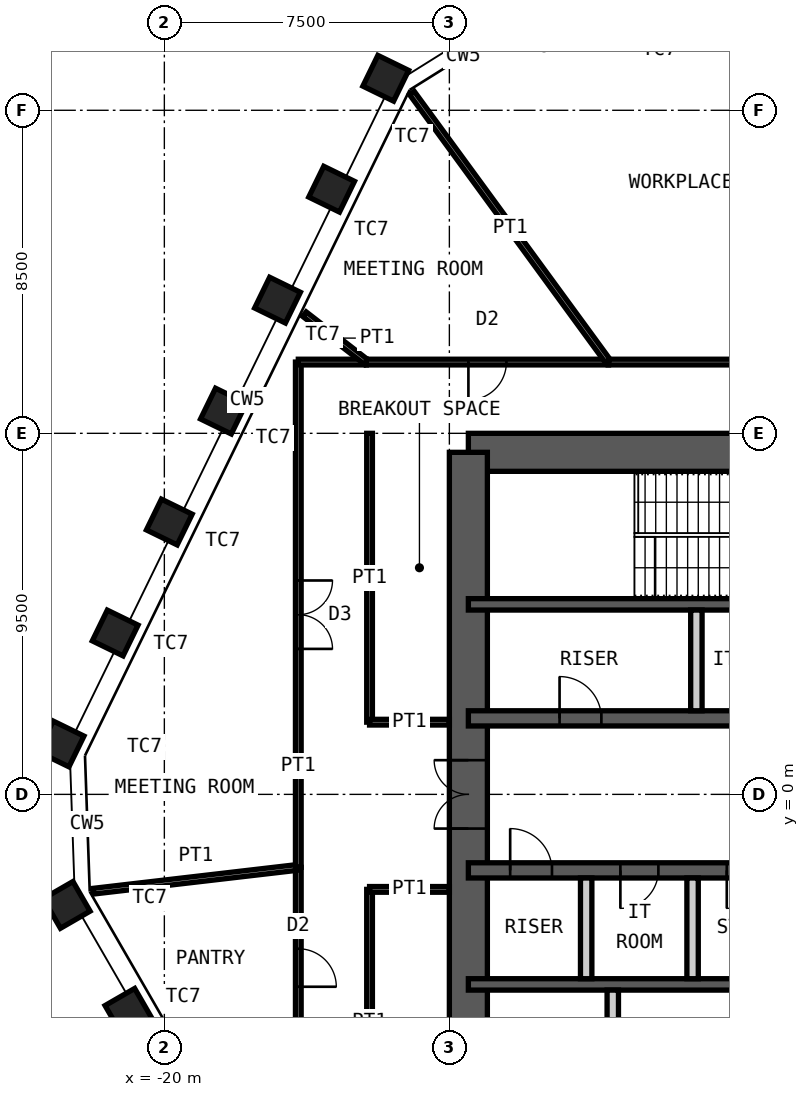
"""IFC4 building model, lengths in metres.
Left out: names, types, materials, properties, quantities, classifications, styles, units other than length and angle.
Written with IfcOpenShell. Run it as: python <this file> out.ifc"""

import sys

from ifc_helpers import new_model, si_unit, direction, frame, frame_2d, origin, origin_2d, place, context, subcontext, project, spatial, rectangle, hollow_rectangle, extrude, element, fill, save


model = new_model("IFC4")
c1 = context("Model", 3, precision=1e-05, world=origin(), true_north=direction((0.0, 1.0)))
c2 = subcontext(c1, "Body", "Model", "MODEL_VIEW")
j1 = project(units=[si_unit("LENGTHUNIT", "METRE"), si_unit("PLANEANGLEUNIT", "RADIAN")], contexts=[c1])
p1 = place(None, origin())
s1 = spatial("IfcSite", under=j1, at=p1, CompositionType="ELEMENT")
p2 = place(p1, origin())
s2 = spatial("IfcBuilding", under=s1, at=p2, CompositionType="ELEMENT")
p3 = place(p2, frame((0.0, 0.0, 287.2)))
s3 = spatial("IfcBuildingStorey", under=s2, at=p3, CompositionType="ELEMENT", Elevation=287.2)
for number, where, z_axis, x_axis in (
    (1, (-20.946, -5.721, 0.0), (0.0, 0.0, 1.0), (0.5, -0.866, 0.0)),
    (2, (-22.57, -2.908, 0.0), (0.0, 0.0, 1.0), (0.5, -0.866, 0.0)),
    (3, (-22.717, 1.327, 0.0), (0.0, 0.0, 1.0), (-0.438, -0.899, 0.0)),
    (4, (-21.293, 4.246, 0.0), (0.0, 0.0, 1.0), (-0.438, -0.899, 0.0)),
    (5, (-19.87, 7.166, 0.0), (0.0, 0.0, 1.0), (-0.438, -0.899, 0.0)),
    (6, (-18.446, 10.085, 0.0), (0.0, 0.0, 1.0), (-0.438, -0.899, 0.0)),
    (7, (-17.022, 13.004, 0.0), (0.0, 0.0, 1.0), (-0.438, -0.899, 0.0)),
    (8, (-15.598, 15.924, 0.0), (0.0, 0.0, 1.0), (-0.438, -0.899, 0.0)),
    (9, (-14.174, 18.843, 0.0), (0.0, 0.0, 1.0), (-0.438, -0.899, 0.0)),
):
    element("IfcColumn", number, at=place(p3, frame(where, z_axis=z_axis, x_axis=x_axis)), inside=s3, PredefinedType="COLUMN", context=c2, shape_type="SweptSolid", body=[
        extrude(hollow_rectangle(XDim=0.9, YDim=0.9, WallThickness=0.06, at=origin_2d()), origin(), (0.0, 0.0, 1.0), 4.2),
    ])
p4 = place(p3, frame((-12.0, 9.0, 0.0), z_axis=(0.0, 0.0, 1.0), x_axis=(1.0, 0.0, 0.0)))
e10 = element("IfcWall", 10, at=p4, inside=s3, PredefinedType="SHEAR", context=c2, shape_type="SweptSolid", body=[
    extrude(rectangle(XDim=24.0, YDim=1.0, at=frame_2d((12.0, 0.0))), origin(), (0.0, 0.0, 1.0), 4.2),
])
p5 = place(p4, frame((10.4, 0.0, 0.0)))
e11 = element("IfcOpeningElement", 11, at=p5, cuts=e10, PredefinedType="OPENING", context=c2, shape_type="SweptSolid", body=[
    extrude(rectangle(XDim=1.0, YDim=2.1, at=frame_2d((0.5, 1.05))), frame((0.0, 0.51, 0.0), z_axis=(0.0, -1.0, 0.0), x_axis=(1.0, 0.0, 0.0)), (0.0, 0.0, 1.0), 1.02),
])
p6 = place(p4, frame((17.6, 0.0, 0.0)))
e12 = element("IfcOpeningElement", 12, at=p6, cuts=e10, PredefinedType="OPENING", context=c2, shape_type="SweptSolid", body=[
    extrude(rectangle(XDim=0.9, YDim=2.1, at=frame_2d((0.45, 1.05))), frame((0.0, 0.51, 0.0), z_axis=(0.0, -1.0, 0.0), x_axis=(1.0, 0.0, 0.0)), (0.0, 0.0, 1.0), 1.02),
])
p7 = place(p4, frame((21.9, 0.0, 0.0)))
e13 = element("IfcOpeningElement", 13, at=p7, cuts=e10, PredefinedType="OPENING", context=c2, shape_type="SweptSolid", body=[
    extrude(rectangle(XDim=0.9, YDim=2.1, at=frame_2d((0.45, 1.05))), frame((0.0, 0.51, 0.0), z_axis=(0.0, -1.0, 0.0), x_axis=(1.0, 0.0, 0.0)), (0.0, 0.0, 1.0), 1.02),
])
p8 = place(p3, frame((-12.0, -9.0, 0.0), z_axis=(0.0, 0.0, 1.0), x_axis=(0.0, 1.0, 0.0)))
e14 = element("IfcWall", 14, at=p8, inside=s3, PredefinedType="SHEAR", context=c2, shape_type="SweptSolid", body=[
    extrude(rectangle(XDim=18.0, YDim=1.0, at=frame_2d((9.0, 0.0))), origin(), (0.0, 0.0, 1.0), 4.2),
])
p9 = place(p8, frame((8.1, 0.0, 0.0)))
e15 = element("IfcOpeningElement", 15, at=p9, cuts=e14, PredefinedType="OPENING", context=c2, shape_type="SweptSolid", body=[
    extrude(rectangle(XDim=1.8, YDim=2.1, at=frame_2d((0.9, 1.05))), frame((0.0, 0.51, 0.0), z_axis=(0.0, -1.0, 0.0), x_axis=(1.0, 0.0, 0.0)), (0.0, 0.0, 1.0), 1.02),
])
p10 = place(p3, frame((-12.0, 5.0, 0.0), z_axis=(0.0, 0.0, 1.0), x_axis=(1.0, 0.0, 0.0)))
e16 = element("IfcWall", 16, at=p10, inside=s3, PredefinedType="SHEAR", context=c2, shape_type="SweptSolid", body=[
    extrude(rectangle(XDim=24.0, YDim=0.3, at=frame_2d((12.0, 0.0))), origin(), (0.0, 0.0, 1.0), 4.2),
])
p11 = place(p3, frame((-12.0, 2.0, 0.0), z_axis=(0.0, 0.0, 1.0), x_axis=(1.0, 0.0, 0.0)))
e17 = element("IfcWall", 17, at=p11, inside=s3, PredefinedType="SHEAR", context=c2, shape_type="SweptSolid", body=[
    extrude(rectangle(XDim=24.0, YDim=0.4, at=frame_2d((12.0, 0.0))), origin(), (0.0, 0.0, 1.0), 4.2),
])
p12 = place(p11, frame((2.4, 0.0, 0.0)))
e18 = element("IfcOpeningElement", 18, at=p12, cuts=e17, PredefinedType="OPENING", context=c2, shape_type="SweptSolid", body=[
    extrude(rectangle(XDim=1.1, YDim=2.1, at=frame_2d((0.55, 1.05))), frame((0.0, 0.21, 0.0), z_axis=(0.0, -1.0, 0.0), x_axis=(1.0, 0.0, 0.0)), (0.0, 0.0, 1.0), 0.42),
])
p13 = place(p11, frame((22.0, 0.0, 0.0)))
e19 = element("IfcOpeningElement", 19, at=p13, cuts=e17, PredefinedType="OPENING", context=c2, shape_type="SweptSolid", body=[
    extrude(rectangle(XDim=1.1, YDim=2.1, at=frame_2d((0.55, 1.05))), frame((0.0, 0.21, 0.0), z_axis=(0.0, -1.0, 0.0), x_axis=(1.0, 0.0, 0.0)), (0.0, 0.0, 1.0), 0.42),
])
p14 = place(p11, frame((10.15, 0.0, 0.0)))
e20 = element("IfcOpeningElement", 20, at=p14, cuts=e17, PredefinedType="OPENING", context=c2, shape_type="SweptSolid", body=[
    extrude(rectangle(XDim=1.0, YDim=2.1, at=frame_2d((0.5, 1.05))), frame((0.0, 0.21, 0.0), z_axis=(0.0, -1.0, 0.0), x_axis=(1.0, 0.0, 0.0)), (0.0, 0.0, 1.0), 0.42),
])
p15 = place(p11, frame((6.9, 0.0, 0.0)))
e21 = element("IfcOpeningElement", 21, at=p15, cuts=e17, PredefinedType="OPENING", context=c2, shape_type="SweptSolid", body=[
    extrude(rectangle(XDim=1.0, YDim=2.1, at=frame_2d((0.5, 1.05))), frame((0.0, 0.21, 0.0), z_axis=(0.0, -1.0, 0.0), x_axis=(1.0, 0.0, 0.0)), (0.0, 0.0, 1.0), 0.42),
])
p16 = place(p11, frame((13.35, 0.0, 0.0)))
e22 = element("IfcOpeningElement", 22, at=p16, cuts=e17, PredefinedType="OPENING", context=c2, shape_type="SweptSolid", body=[
    extrude(rectangle(XDim=1.1, YDim=2.4, at=frame_2d((0.55, 1.2))), frame((0.0, 0.21, 0.0), z_axis=(0.0, -1.0, 0.0), x_axis=(1.0, 0.0, 0.0)), (0.0, 0.0, 1.0), 0.42),
])
p17 = place(p11, frame((16.15, 0.0, 0.0)))
e23 = element("IfcOpeningElement", 23, at=p17, cuts=e17, PredefinedType="OPENING", context=c2, shape_type="SweptSolid", body=[
    extrude(rectangle(XDim=1.1, YDim=2.4, at=frame_2d((0.55, 1.2))), frame((0.0, 0.21, 0.0), z_axis=(0.0, -1.0, 0.0), x_axis=(1.0, 0.0, 0.0)), (0.0, 0.0, 1.0), 0.42),
])
p18 = place(p11, frame((19.0, 0.0, 0.0)))
e24 = element("IfcOpeningElement", 24, at=p18, cuts=e17, PredefinedType="OPENING", context=c2, shape_type="SweptSolid", body=[
    extrude(rectangle(XDim=1.0, YDim=2.1, at=frame_2d((0.5, 1.05))), frame((0.0, 0.21, 0.0), z_axis=(0.0, -1.0, 0.0), x_axis=(1.0, 0.0, 0.0)), (0.0, 0.0, 1.0), 0.42),
])
p19 = place(p3, frame((-12.0, -2.0, 0.0), z_axis=(0.0, 0.0, 1.0), x_axis=(1.0, 0.0, 0.0)))
e25 = element("IfcWall", 25, at=p19, inside=s3, PredefinedType="SHEAR", context=c2, shape_type="SweptSolid", body=[
    extrude(rectangle(XDim=24.0, YDim=0.4, at=frame_2d((12.0, 0.0))), origin(), (0.0, 0.0, 1.0), 4.2),
])
p20 = place(p19, frame((1.1, 0.0, 0.0)))
e26 = element("IfcOpeningElement", 26, at=p20, cuts=e25, PredefinedType="OPENING", context=c2, shape_type="SweptSolid", body=[
    extrude(rectangle(XDim=1.1, YDim=2.1, at=frame_2d((0.55, 1.05))), frame((0.0, 0.21, 0.0), z_axis=(0.0, -1.0, 0.0), x_axis=(1.0, 0.0, 0.0)), (0.0, 0.0, 1.0), 0.42),
])
p21 = place(p19, frame((13.55, 0.0, 0.0)))
e27 = element("IfcOpeningElement", 27, at=p21, cuts=e25, PredefinedType="OPENING", context=c2, shape_type="SweptSolid", body=[
    extrude(rectangle(XDim=1.1, YDim=2.1, at=frame_2d((0.55, 1.05))), frame((0.0, 0.21, 0.0), z_axis=(0.0, -1.0, 0.0), x_axis=(1.0, 0.0, 0.0)), (0.0, 0.0, 1.0), 0.42),
])
p22 = place(p19, frame((20.7, 0.0, 0.0)))
e28 = element("IfcOpeningElement", 28, at=p22, cuts=e25, PredefinedType="OPENING", context=c2, shape_type="SweptSolid", body=[
    extrude(rectangle(XDim=1.1, YDim=2.1, at=frame_2d((0.55, 1.05))), frame((0.0, 0.21, 0.0), z_axis=(0.0, -1.0, 0.0), x_axis=(1.0, 0.0, 0.0)), (0.0, 0.0, 1.0), 0.42),
])
p23 = place(p19, frame((4.0, 0.0, 0.0)))
e29 = element("IfcOpeningElement", 29, at=p23, cuts=e25, PredefinedType="OPENING", context=c2, shape_type="SweptSolid", body=[
    extrude(rectangle(XDim=1.0, YDim=2.1, at=frame_2d((0.5, 1.05))), frame((0.0, 0.21, 0.0), z_axis=(0.0, -1.0, 0.0), x_axis=(1.0, 0.0, 0.0)), (0.0, 0.0, 1.0), 0.42),
])
p24 = place(p19, frame((6.8, 0.0, 0.0)))
e30 = element("IfcOpeningElement", 30, at=p24, cuts=e25, PredefinedType="OPENING", context=c2, shape_type="SweptSolid", body=[
    extrude(rectangle(XDim=1.0, YDim=2.1, at=frame_2d((0.5, 1.05))), frame((0.0, 0.21, 0.0), z_axis=(0.0, -1.0, 0.0), x_axis=(1.0, 0.0, 0.0)), (0.0, 0.0, 1.0), 0.42),
])
p25 = place(p19, frame((9.6, 0.0, 0.0)))
e31 = element("IfcOpeningElement", 31, at=p25, cuts=e25, PredefinedType="OPENING", context=c2, shape_type="SweptSolid", body=[
    extrude(rectangle(XDim=1.0, YDim=2.1, at=frame_2d((0.5, 1.05))), frame((0.0, 0.21, 0.0), z_axis=(0.0, -1.0, 0.0), x_axis=(1.0, 0.0, 0.0)), (0.0, 0.0, 1.0), 0.42),
])
p26 = place(p3, frame((-12.0, -5.0, 0.0), z_axis=(0.0, 0.0, 1.0), x_axis=(1.0, 0.0, 0.0)))
e32 = element("IfcWall", 32, at=p26, inside=s3, PredefinedType="SHEAR", context=c2, shape_type="SweptSolid", body=[
    extrude(rectangle(XDim=24.0, YDim=0.3, at=frame_2d((12.0, 0.0))), origin(), (0.0, 0.0, 1.0), 4.2),
])
for number, where, z_axis, x_axis in (
    (33, (-6.0, 2.2, 0.0), (0.0, 0.0, 1.0), (0.0, 1.0, 0.0)),
    (34, (-8.9, -4.85, 0.0), (0.0, 0.0, 1.0), (0.0, 1.0, 0.0)),
    (35, (-6.1, -4.85, 0.0), (0.0, 0.0, 1.0), (0.0, 1.0, 0.0)),
):
    element("IfcWall", number, at=place(p3, frame(where, z_axis=z_axis, x_axis=x_axis)), inside=s3, PredefinedType="PARTITIONING", context=c2, shape_type="SweptSolid", body=[
        extrude(rectangle(XDim=2.65, YDim=0.3, at=frame_2d((1.325, 0.0))), origin(), (0.0, 0.0, 1.0), 3.98),
    ])
p27 = place(p3, frame((-8.2, -9.0, 0.0), z_axis=(0.0, 0.0, 1.0), x_axis=(0.0, 1.0, 0.0)))
e36 = element("IfcWall", 36, at=p27, inside=s3, PredefinedType="PARTITIONING", context=c2, shape_type="SweptSolid", body=[
    extrude(rectangle(XDim=3.85, YDim=0.3, at=frame_2d((1.925, 0.0))), origin(), (0.0, 0.0, 1.0), 3.98),
])
p28 = place(p3, frame((-16.475, -7.205, 0.0), z_axis=(0.0, 0.0, 1.0), x_axis=(0.0, 1.0, 0.0)))
e37 = element("IfcWall", 37, at=p28, inside=s3, PredefinedType="PARTITIONING", context=c2, shape_type="SweptSolid", body=[
    extrude(rectangle(XDim=5.285, YDim=0.15, at=frame_2d((2.643, 0.0))), origin(), (0.0, 0.0, 1.0), 4.03),
])
p29 = place(p28, frame((2.143, 0.0, 0.0)))
e38 = element("IfcOpeningElement", 38, at=p29, cuts=e37, PredefinedType="OPENING", context=c2, shape_type="SweptSolid", body=[
    extrude(rectangle(XDim=1.0, YDim=2.4, at=frame_2d((0.5, 1.2))), frame((0.0, 0.085, 0.0), z_axis=(0.0, -1.0, 0.0), x_axis=(1.0, 0.0, 0.0)), (0.0, 0.0, 1.0), 0.17),
])
p30 = place(p3, frame((-21.864, -2.547, 0.0), z_axis=(0.0, 0.0, 1.0), x_axis=(0.993284789299, 0.115694975458, 0.0)))
e39 = element("IfcWall", 39, at=p30, inside=s3, PredefinedType="PARTITIONING", context=c2, shape_type="SweptSolid", body=[
    extrude(rectangle(XDim=5.425, YDim=0.15, at=frame_2d((2.713, 0.0))), origin(), (0.0, 0.0, 1.0), 2.93),
])
p31 = place(p3, frame((-16.475, -1.919, 0.0), z_axis=(0.0, 0.0, 1.0), x_axis=(0.0, 1.0, 0.0)))
e40 = element("IfcWall", 40, at=p31, inside=s3, PredefinedType="PARTITIONING", context=c2, shape_type="SweptSolid", body=[
    extrude(rectangle(XDim=13.294, YDim=0.15, at=frame_2d((6.647, 0.0))), origin(), (0.0, 0.0, 1.0), 4.03),
])
p32 = place(p31, frame((5.747, 0.0, 0.0)))
e41 = element("IfcOpeningElement", 41, at=p32, cuts=e40, PredefinedType="OPENING", context=c2, shape_type="SweptSolid", body=[
    extrude(rectangle(XDim=1.8, YDim=2.4, at=frame_2d((0.9, 1.2))), frame((0.0, 0.085, 0.0), z_axis=(0.0, -1.0, 0.0), x_axis=(1.0, 0.0, 0.0)), (0.0, 0.0, 1.0), 0.17),
])
p33 = place(p3, frame((-16.475, 11.375, 0.0), z_axis=(0.0, 0.0, 1.0), x_axis=(1.0, 0.0, 0.0)))
e42 = element("IfcWall", 42, at=p33, inside=s3, PredefinedType="PARTITIONING", context=c2, shape_type="SweptSolid", body=[
    extrude(rectangle(XDim=1.79, YDim=0.15, at=frame_2d((0.895, 0.0))), origin(), (0.0, 0.0, 1.0), 4.03),
])
p34 = place(p3, frame((-16.314, 12.636, 0.0), z_axis=(0.0, 0.0, 1.0), x_axis=(0.790557087003, -0.612388350796, 0.0)))
e43 = element("IfcWall", 43, at=p34, inside=s3, PredefinedType="PARTITIONING", context=c2, shape_type="SweptSolid", body=[
    extrude(rectangle(XDim=2.06, YDim=0.15, at=frame_2d((1.03, 0.0))), origin(), (0.0, 0.0, 1.0), 3.33),
])
p35 = place(p3, frame((-14.686, 11.375, 0.0), z_axis=(0.0, 0.0, 1.0), x_axis=(1.0, 0.0, 0.0)))
e44 = element("IfcWall", 44, at=p35, inside=s3, PredefinedType="PARTITIONING", context=c2, shape_type="SweptSolid", body=[
    extrude(rectangle(XDim=6.373, YDim=0.15, at=frame_2d((3.187, 0.0))), origin(), (0.0, 0.0, 1.0), 4.03),
])
p36 = place(p35, frame((2.687, 0.0, 0.0)))
e45 = element("IfcOpeningElement", 45, at=p36, cuts=e44, PredefinedType="OPENING", context=c2, shape_type="SweptSolid", body=[
    extrude(rectangle(XDim=1.0, YDim=2.4, at=frame_2d((0.5, 1.2))), frame((0.0, 0.085, 0.0), z_axis=(0.0, -1.0, 0.0), x_axis=(1.0, 0.0, 0.0)), (0.0, 0.0, 1.0), 0.17),
])
p37 = place(p3, frame((-13.486, 18.455, 0.0), z_axis=(0.0, 0.0, 1.0), x_axis=(0.589997742419, -0.807404894672, 0.0)))
e46 = element("IfcWall", 46, at=p37, inside=s3, PredefinedType="PARTITIONING", context=c2, shape_type="SweptSolid", body=[
    extrude(rectangle(XDim=8.769, YDim=0.15, at=frame_2d((4.385, 0.0))), origin(), (0.0, 0.0, 1.0), 2.93),
])
p38 = place(p3, frame((-8.312, 11.375, 0.0), z_axis=(0.0, 0.0, 1.0), x_axis=(1.0, 0.0, 0.0)))
e47 = element("IfcWall", 47, at=p38, inside=s3, PredefinedType="PARTITIONING", context=c2, shape_type="SweptSolid", body=[
    extrude(rectangle(XDim=9.584, YDim=0.15, at=frame_2d((4.792, 0.0))), origin(), (0.0, 0.0, 1.0), 4.03),
])
p39 = place(p38, frame((3.892, 0.0, 0.0)))
e48 = element("IfcOpeningElement", 48, at=p39, cuts=e47, PredefinedType="OPENING", context=c2, shape_type="SweptSolid", body=[
    extrude(rectangle(XDim=1.8, YDim=2.4, at=frame_2d((0.9, 1.2))), frame((0.0, 0.085, 0.0), z_axis=(0.0, -1.0, 0.0), x_axis=(1.0, 0.0, 0.0)), (0.0, 0.0, 1.0), 0.17),
])
p40 = place(p3, frame((-14.6, 1.9, 0.0), z_axis=(0.0, 0.0, 1.0), x_axis=(0.0, 1.0, 0.0)))
e49 = element("IfcWall", 49, at=p40, inside=s3, PredefinedType="PARTITIONING", context=c2, shape_type="SweptSolid", body=[
    extrude(rectangle(XDim=7.6, YDim=0.15, at=frame_2d((3.8, 0.0))), origin(), (0.0, 0.0, 1.0), 4.03),
])
p41 = place(p3, frame((-12.5, 1.9, 0.0), z_axis=(0.0, 0.0, 1.0), x_axis=(-1.0, 0.0, 0.0)))
e50 = element("IfcWall", 50, at=p41, inside=s3, PredefinedType="PARTITIONING", context=c2, shape_type="SweptSolid", body=[
    extrude(rectangle(XDim=2.1, YDim=0.15, at=frame_2d((1.05, 0.0))), origin(), (0.0, 0.0, 1.0), 3.53),
])
p42 = place(p3, frame((-14.6, -9.5, 0.0), z_axis=(0.0, 0.0, 1.0), x_axis=(0.0, 1.0, 0.0)))
e51 = element("IfcWall", 51, at=p42, inside=s3, PredefinedType="PARTITIONING", context=c2, shape_type="SweptSolid", body=[
    extrude(rectangle(XDim=7.0, YDim=0.15, at=frame_2d((3.5, 0.0))), origin(), (0.0, 0.0, 1.0), 4.03),
])
p43 = place(p3, frame((-12.5, -2.5, 0.0), z_axis=(0.0, 0.0, 1.0), x_axis=(-1.0, 0.0, 0.0)))
e52 = element("IfcWall", 52, at=p43, inside=s3, PredefinedType="PARTITIONING", context=c2, shape_type="SweptSolid", body=[
    extrude(rectangle(XDim=2.1, YDim=0.15, at=frame_2d((1.05, 0.0))), origin(), (0.0, 0.0, 1.0), 3.53),
])
p44 = place(p12, origin())
e53 = element("IfcDoor", 53, at=p44, inside=s3, OperationType="SINGLE_SWING_RIGHT", PredefinedType="DOOR", context=c2, shape_type="SweptSolid", body=[
    extrude(rectangle(XDim=1.1, YDim=2.1, at=frame_2d((0.55, 1.05))), frame((0.0, 0.025, 0.0), z_axis=(0.0, -1.0, 0.0), x_axis=(1.0, 0.0, 0.0)), (0.0, 0.0, 1.0), 0.05),
])
fill(e18, e53)
p45 = place(p20, origin())
e54 = element("IfcDoor", 54, at=p45, inside=s3, OperationType="SINGLE_SWING_RIGHT", PredefinedType="DOOR", context=c2, shape_type="SweptSolid", body=[
    extrude(rectangle(XDim=1.1, YDim=2.1, at=frame_2d((0.55, 1.05))), frame((0.0, 0.025, 0.0), z_axis=(0.0, -1.0, 0.0), x_axis=(1.0, 0.0, 0.0)), (0.0, 0.0, 1.0), 0.05),
])
fill(e26, e54)
p46 = place(p9, origin())
e55 = element("IfcDoor", 55, at=p46, inside=s3, OperationType="DOUBLE_DOOR_DOUBLE_SWING", PredefinedType="DOOR", context=c2, shape_type="SweptSolid", body=[
    extrude(rectangle(XDim=1.8, YDim=2.1, at=frame_2d((0.9, 1.05))), frame((0.0, 0.025, 0.0), z_axis=(0.0, -1.0, 0.0), x_axis=(1.0, 0.0, 0.0)), (0.0, 0.0, 1.0), 0.05),
])
fill(e15, e55)
p47 = place(p23, origin())
e56 = element("IfcDoor", 56, at=p47, inside=s3, OperationType="SINGLE_SWING_LEFT", PredefinedType="DOOR", context=c2, shape_type="SweptSolid", body=[
    extrude(rectangle(XDim=1.0, YDim=2.1, at=frame_2d((0.5, 1.05))), frame((0.0, 0.025, 0.0), z_axis=(0.0, -1.0, 0.0), x_axis=(1.0, 0.0, 0.0)), (0.0, 0.0, 1.0), 0.05),
])
fill(e29, e56)
p48 = place(p24, origin())
e57 = element("IfcDoor", 57, at=p48, inside=s3, OperationType="SINGLE_SWING_LEFT", PredefinedType="DOOR", context=c2, shape_type="SweptSolid", body=[
    extrude(rectangle(XDim=1.0, YDim=2.1, at=frame_2d((0.5, 1.05))), frame((0.0, 0.025, 0.0), z_axis=(0.0, -1.0, 0.0), x_axis=(1.0, 0.0, 0.0)), (0.0, 0.0, 1.0), 0.05),
])
fill(e30, e57)
p49 = place(p29, origin())
e58 = element("IfcDoor", 58, at=p49, inside=s3, OperationType="SINGLE_SWING_LEFT", PredefinedType="DOOR", context=c2, shape_type="SweptSolid", body=[
    extrude(rectangle(XDim=1.0, YDim=2.4, at=frame_2d((0.5, 1.2))), frame((0.0, 0.025, 0.0), z_axis=(0.0, -1.0, 0.0), x_axis=(1.0, 0.0, 0.0)), (0.0, 0.0, 1.0), 0.05),
])
fill(e38, e58)
p50 = place(p32, origin())
e59 = element("IfcDoor", 59, at=p50, inside=s3, OperationType="DOUBLE_DOOR_DOUBLE_SWING", PredefinedType="DOOR", context=c2, shape_type="SweptSolid", body=[
    extrude(rectangle(XDim=1.8, YDim=2.4, at=frame_2d((0.9, 1.2))), frame((0.0, 0.025, 0.0), z_axis=(0.0, -1.0, 0.0), x_axis=(1.0, 0.0, 0.0)), (0.0, 0.0, 1.0), 0.05),
])
fill(e41, e59)
p51 = place(p36, origin())
e60 = element("IfcDoor", 60, at=p51, inside=s3, OperationType="SINGLE_SWING_LEFT", PredefinedType="DOOR", context=c2, shape_type="SweptSolid", body=[
    extrude(rectangle(XDim=1.0, YDim=2.4, at=frame_2d((0.5, 1.2))), frame((0.0, 0.025, 0.0), z_axis=(0.0, -1.0, 0.0), x_axis=(1.0, 0.0, 0.0)), (0.0, 0.0, 1.0), 0.05),
])
fill(e45, e60)
save(model, sys.argv[1])
